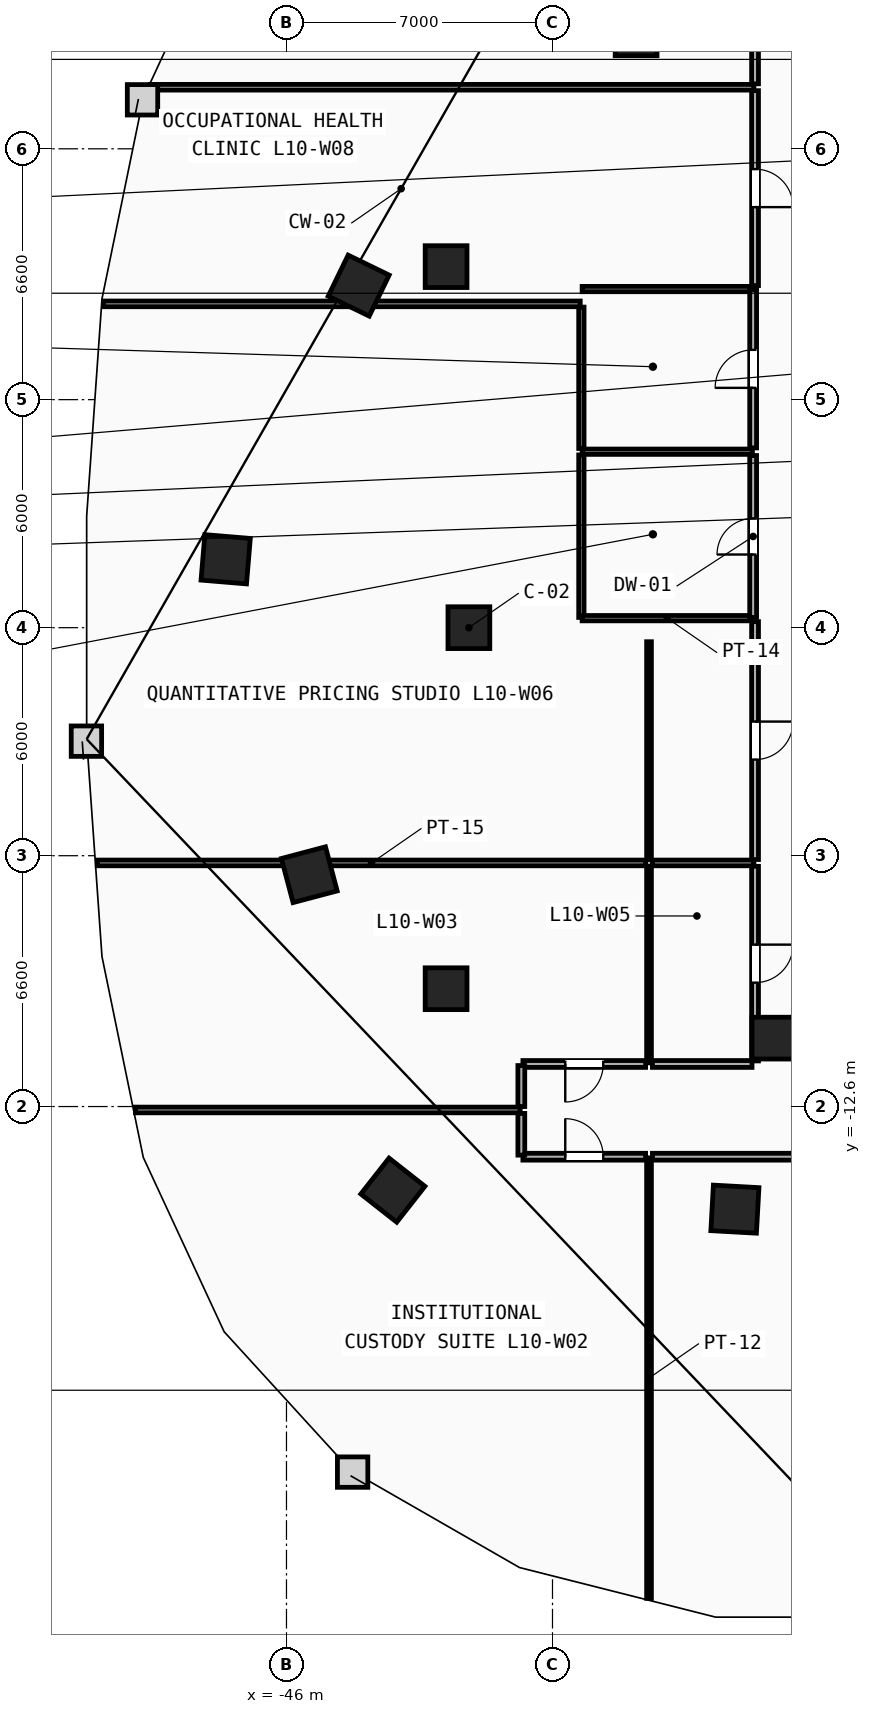
"""IFC4 building model, lengths in metres.
Left out: names, types, materials, properties, quantities, classifications, styles, units other than length and angle.
Written with IfcOpenShell. Run it as: python <this file> out.ifc"""

import sys

from ifc_helpers import new_model, si_unit, direction, frame, frame_2d, origin, origin_2d, place, context, subcontext, project, spatial, rectangle, extrude, element, fill, save


model = new_model("IFC4")
c1 = context("Model", 3, precision=1e-05, world=origin(), true_north=direction((0.0, 1.0)))
c2 = subcontext(c1, "Body", "Model", "MODEL_VIEW")
j1 = project(units=[si_unit("LENGTHUNIT", "METRE"), si_unit("PLANEANGLEUNIT", "RADIAN")], contexts=[c1])
p1 = place(None, origin())
s1 = spatial("IfcSite", under=j1, at=p1, CompositionType="ELEMENT")
p2 = place(p1, origin())
s2 = spatial("IfcBuilding", under=s1, at=p2, CompositionType="ELEMENT")
p3 = place(p2, frame((0.0, 0.0, 43.0)))
s3 = spatial("IfcBuildingStorey", under=s2, at=p3, CompositionType="ELEMENT", Elevation=43.0)
for number, where, z_axis, x_axis in (
    (1, (-41.2, 0.0, 0.0), (0.0, 0.0, 1.0), (1.0, 0.0, 0.0)),
    (2, (-41.8, 9.5, 0.0), (0.0, 0.0, 1.0), (1.0, 0.0, 0.0)),
    (3, (-36.8, 15.6, 0.0), (0.0, 0.0, 1.0), (1.0, 0.0, 0.0)),
    (4, (-41.8, -9.5, 0.0), (0.0, 0.0, 1.0), (1.0, 0.0, 0.0)),
    (5, (-33.2, -10.8, 0.0), (0.0, 0.0, 1.0), (1.0, 0.0, 0.0)),
):
    element("IfcColumn", number, at=place(p3, frame(where, z_axis=z_axis, x_axis=x_axis)), inside=s3, PredefinedType="COLUMN", context=c2, shape_type="SweptSolid", body=[
        extrude(rectangle(XDim=1.1, YDim=1.1, at=origin_2d()), origin(), (0.0, 0.0, 1.0), 3.8),
    ])
for number, where, z_axis, x_axis in (
    (6, (-44.1, 9.0, 0.0), (0.0, 0.0, 1.0), (-0.437, -0.899, 0.0)),
    (7, (-47.6, 1.8, 0.0), (0.0, 0.0, 1.0), (-0.084, -0.997, 0.0)),
    (8, (-45.4, -6.5, 0.0), (0.0, 0.0, 1.0), (0.256, -0.967, 0.0)),
    (9, (-43.2, -14.8, 0.0), (0.0, 0.0, 1.0), (0.786, -0.618, 0.0)),
    (10, (-34.2, -15.3, 0.0), (0.0, 0.0, 1.0), (0.998, -0.055, 0.0)),
):
    element("IfcColumn", number, at=place(p3, frame(where, z_axis=z_axis, x_axis=x_axis)), inside=s3, PredefinedType="COLUMN", context=c2, shape_type="SweptSolid", body=[
        extrude(rectangle(XDim=1.2, YDim=1.2, at=origin_2d()), origin(), (0.0, 0.0, 1.0), 3.8),
    ])
p4 = place(p3, frame((-38.24, 0.27, 0.0), z_axis=(0.0, 0.0, 1.0), x_axis=(0.0, 1.0, 0.0)))
e11 = element("IfcWall", 11, at=p4, inside=s3, PredefinedType="PARTITIONING", context=c2, shape_type="SweptSolid", body=[
    extrude(rectangle(XDim=4.275, YDim=0.14, at=frame_2d((2.137, 0.0))), origin(), (0.0, 0.0, 1.0), 3.5),
])
p5 = place(p3, frame((-38.24, 4.715, 0.0), z_axis=(0.0, 0.0, 1.0), x_axis=(0.0, 1.0, 0.0)))
e12 = element("IfcWall", 12, at=p5, inside=s3, PredefinedType="PARTITIONING", context=c2, shape_type="SweptSolid", body=[
    extrude(rectangle(XDim=3.72, YDim=0.14, at=frame_2d((1.86, 0.0))), origin(), (0.0, 0.0, 1.0), 3.5),
])
for number, where, z_axis, x_axis in (
    (13, (-38.22, 0.25, 0.0), (0.0, 0.0, 1.0), (1.0, 0.0, 0.0)),
    (14, (-38.22, 4.63, 0.0), (0.0, 0.0, 1.0), (1.0, 0.0, 0.0)),
    (15, (-38.22, 8.91, 0.0), (0.0, 0.0, 1.0), (1.0, 0.0, 0.0)),
):
    element("IfcWall", number, at=place(p3, frame(where, z_axis=z_axis, x_axis=x_axis)), inside=s3, PredefinedType="PARTITIONING", context=c2, shape_type="SweptSolid", body=[
        extrude(rectangle(XDim=4.48, YDim=0.14, at=frame_2d((2.24, 0.0))), origin(), (0.0, 0.0, 1.0), 3.5),
    ])
p6 = place(p3, frame((-33.72, 0.27, 0.0), z_axis=(0.0, 0.0, 1.0), x_axis=(0.0, 1.0, 0.0)))
e16 = element("IfcWall", 16, at=p6, inside=s3, PredefinedType="PARTITIONING", context=c2, shape_type="SweptSolid", body=[
    extrude(rectangle(XDim=4.26, YDim=0.18, at=frame_2d((2.13, 0.0))), origin(), (0.0, 0.0, 1.0), 3.5),
])
p7 = place(p6, frame((1.655, 0.0, 0.0)))
e17 = element("IfcOpeningElement", 17, at=p7, cuts=e16, PredefinedType="OPENING", context=c2, shape_type="SweptSolid", body=[
    extrude(rectangle(XDim=0.95, YDim=2.1, at=frame_2d((0.475, 1.05))), frame((0.0, 0.1, 0.0), z_axis=(0.0, -1.0, 0.0), x_axis=(1.0, 0.0, 0.0)), (0.0, 0.0, 1.0), 0.2),
])
p8 = place(p3, frame((-33.72, 4.73, 0.0), z_axis=(0.0, 0.0, 1.0), x_axis=(0.0, 1.0, 0.0)))
e18 = element("IfcWall", 18, at=p8, inside=s3, PredefinedType="PARTITIONING", context=c2, shape_type="SweptSolid", body=[
    extrude(rectangle(XDim=4.16, YDim=0.18, at=frame_2d((2.08, 0.0))), origin(), (0.0, 0.0, 1.0), 3.5),
])
p9 = place(p8, frame((1.58, 0.0, 0.0)))
e19 = element("IfcOpeningElement", 19, at=p9, cuts=e18, PredefinedType="OPENING", context=c2, shape_type="SweptSolid", body=[
    extrude(rectangle(XDim=1.0, YDim=2.15, at=frame_2d((0.5, 1.075))), frame((0.0, 0.1, 0.0), z_axis=(0.0, -1.0, 0.0), x_axis=(1.0, 0.0, 0.0)), (0.0, 0.0, 1.0), 0.2),
])
p10 = place(p3, frame((-36.46, -25.541, 0.0), z_axis=(0.0, 0.0, 1.0), x_axis=(0.0, 1.0, 0.0)))
e20 = element("IfcWall", 20, at=p10, inside=s3, PredefinedType="PARTITIONING", context=c2, shape_type="SweptSolid", body=[
    extrude(rectangle(XDim=11.591, YDim=0.125, at=frame_2d((5.795, 0.0))), origin(), (0.0, 0.0, 1.0), 3.5),
])
p11 = place(p3, frame((-36.46, -11.45, 0.0), z_axis=(0.0, 0.0, 1.0), x_axis=(0.0, 1.0, 0.0)))
e21 = element("IfcWall", 21, at=p11, inside=s3, PredefinedType="PARTITIONING", context=c2, shape_type="SweptSolid", body=[
    extrude(rectangle(XDim=5.175, YDim=0.125, at=frame_2d((2.587, 0.0))), origin(), (0.0, 0.0, 1.0), 3.5),
])
p12 = place(p3, frame((-36.46, -6.105, 0.0), z_axis=(0.0, 0.0, 1.0), x_axis=(0.0, 1.0, 0.0)))
e22 = element("IfcWall", 22, at=p12, inside=s3, PredefinedType="PARTITIONING", context=c2, shape_type="SweptSolid", body=[
    extrude(rectangle(XDim=5.735, YDim=0.125, at=frame_2d((2.867, 0.0))), origin(), (0.0, 0.0, 1.0), 3.5),
])
p13 = place(p3, frame((-50.979, -6.19, 0.0), z_axis=(0.0, 0.0, 1.0), x_axis=(1.0, 0.0, 0.0)))
e23 = element("IfcWall", 23, at=p13, inside=s3, PredefinedType="PARTITIONING", context=c2, shape_type="SweptSolid", body=[
    extrude(rectangle(XDim=14.434, YDim=0.15, at=frame_2d((7.217, 0.0))), origin(), (0.0, 0.0, 1.0), 3.5),
])
p14 = place(p3, frame((-36.375, -6.19, 0.0), z_axis=(0.0, 0.0, 1.0), x_axis=(1.0, 0.0, 0.0)))
e24 = element("IfcWall", 24, at=p14, inside=s3, PredefinedType="PARTITIONING", context=c2, shape_type="SweptSolid", body=[
    extrude(rectangle(XDim=2.675, YDim=0.15, at=frame_2d((1.337, 0.0))), origin(), (0.0, 0.0, 1.0), 3.5),
])
p15 = place(p3, frame((-49.974, -12.69, 0.0), z_axis=(0.0, 0.0, 1.0), x_axis=(1.0, 0.0, 0.0)))
e25 = element("IfcWall", 25, at=p15, inside=s3, PredefinedType="PARTITIONING", context=c2, shape_type="SweptSolid", body=[
    extrude(rectangle(XDim=10.124, YDim=0.15, at=frame_2d((5.062, 0.0))), origin(), (0.0, 0.0, 1.0), 3.5),
])
p16 = place(p3, frame((-50.814, 8.52, 0.0), z_axis=(0.0, 0.0, 1.0), x_axis=(1.0, 0.0, 0.0)))
e26 = element("IfcWall", 26, at=p16, inside=s3, PredefinedType="PARTITIONING", context=c2, shape_type="SweptSolid", body=[
    extrude(rectangle(XDim=12.544, YDim=0.15, at=frame_2d((6.272, 0.0))), origin(), (0.0, 0.0, 1.0), 3.5),
])
p17 = place(p3, frame((-49.585, 14.22, 0.0), z_axis=(0.0, 0.0, 1.0), x_axis=(1.0, 0.0, 0.0)))
e27 = element("IfcWall", 27, at=p17, inside=s3, PredefinedType="PARTITIONING", context=c2, shape_type="SweptSolid", body=[
    extrude(rectangle(XDim=15.885, YDim=0.15, at=frame_2d((7.942, 0.0))), origin(), (0.0, 0.0, 1.0), 3.5),
])
p18 = place(p3, frame((-36.37, -13.92, 0.0), z_axis=(0.0, 0.0, 1.0), x_axis=(1.0, 0.0, 0.0)))
e28 = element("IfcWall", 28, at=p18, inside=s3, PredefinedType="PARTITIONING", context=c2, shape_type="SweptSolid", body=[
    extrude(rectangle(XDim=11.149, YDim=0.18, at=frame_2d((5.574, 0.0))), origin(), (0.0, 0.0, 1.0), 3.5),
])
p19 = place(p18, frame((5.074, 0.0, 0.0)))
e29 = element("IfcOpeningElement", 29, at=p19, cuts=e28, PredefinedType="OPENING", context=c2, shape_type="SweptSolid", body=[
    extrude(rectangle(XDim=1.0, YDim=2.15, at=frame_2d((0.5, 1.075))), frame((0.0, 0.1, 0.0), z_axis=(0.0, -1.0, 0.0), x_axis=(1.0, 0.0, 0.0)), (0.0, 0.0, 1.0), 0.2),
])
p20 = place(p3, frame((-39.779, -13.92, 0.0), z_axis=(0.0, 0.0, 1.0), x_axis=(1.0, 0.0, 0.0)))
e30 = element("IfcWall", 30, at=p20, inside=s3, PredefinedType="PARTITIONING", context=c2, shape_type="SweptSolid", body=[
    extrude(rectangle(XDim=3.229, YDim=0.18, at=frame_2d((1.614, 0.0))), origin(), (0.0, 0.0, 1.0), 3.5),
])
p21 = place(p20, frame((1.114, 0.0, 0.0)))
e31 = element("IfcOpeningElement", 31, at=p21, cuts=e30, PredefinedType="OPENING", context=c2, shape_type="SweptSolid", body=[
    extrude(rectangle(XDim=1.0, YDim=2.15, at=frame_2d((0.5, 1.075))), frame((0.0, 0.1, 0.0), z_axis=(0.0, -1.0, 0.0), x_axis=(1.0, 0.0, 0.0)), (0.0, 0.0, 1.0), 0.2),
])
p22 = place(p3, frame((-39.82, -12.78, 0.0), z_axis=(0.0, 0.0, 1.0), x_axis=(0.0, -1.0, 0.0)))
e32 = element("IfcWall", 32, at=p22, inside=s3, PredefinedType="PARTITIONING", context=c2, shape_type="SweptSolid", body=[
    extrude(rectangle(XDim=1.098, YDim=0.18, at=frame_2d((0.549, 0.0))), origin(), (0.0, 0.0, 1.0), 3.5),
])
p23 = place(p3, frame((-36.55, -11.48, 0.0), z_axis=(0.0, 0.0, 1.0), x_axis=(-1.0, 0.0, 0.0)))
e33 = element("IfcWall", 33, at=p23, inside=s3, PredefinedType="PARTITIONING", context=c2, shape_type="SweptSolid", body=[
    extrude(rectangle(XDim=3.229, YDim=0.18, at=frame_2d((1.614, 0.0))), origin(), (0.0, 0.0, 1.0), 3.5),
])
p24 = place(p23, frame((1.114, 0.0, 0.0)))
e34 = element("IfcOpeningElement", 34, at=p24, cuts=e33, PredefinedType="OPENING", context=c2, shape_type="SweptSolid", body=[
    extrude(rectangle(XDim=1.0, YDim=2.15, at=frame_2d((0.5, 1.075))), frame((0.0, 0.1, 0.0), z_axis=(0.0, -1.0, 0.0), x_axis=(1.0, 0.0, 0.0)), (0.0, 0.0, 1.0), 0.2),
])
p25 = place(p3, frame((-39.82, -11.521, 0.0), z_axis=(0.0, 0.0, 1.0), x_axis=(0.0, -1.0, 0.0)))
e35 = element("IfcWall", 35, at=p25, inside=s3, PredefinedType="PARTITIONING", context=c2, shape_type="SweptSolid", body=[
    extrude(rectangle(XDim=1.079, YDim=0.18, at=frame_2d((0.539, 0.0))), origin(), (0.0, 0.0, 1.0), 3.5),
])
p26 = place(p3, frame((-33.67, -6.28, 0.0), z_axis=(0.0, 0.0, 1.0), x_axis=(0.0, -1.0, 0.0)))
e36 = element("IfcWall", 36, at=p26, inside=s3, PredefinedType="PARTITIONING", context=c2, shape_type="SweptSolid", body=[
    extrude(rectangle(XDim=5.12, YDim=0.18, at=frame_2d((2.56, 0.0))), origin(), (0.0, 0.0, 1.0), 3.5),
])
p27 = place(p26, frame((2.06, 0.0, 0.0)))
e37 = element("IfcOpeningElement", 37, at=p27, cuts=e36, PredefinedType="OPENING", context=c2, shape_type="SweptSolid", body=[
    extrude(rectangle(XDim=1.0, YDim=2.15, at=frame_2d((0.5, 1.075))), frame((0.0, 0.1, 0.0), z_axis=(0.0, -1.0, 0.0), x_axis=(1.0, 0.0, 0.0)), (0.0, 0.0, 1.0), 0.2),
])
p28 = place(p3, frame((-33.75, -11.48, 0.0), z_axis=(0.0, 0.0, 1.0), x_axis=(-1.0, 0.0, 0.0)))
e38 = element("IfcWall", 38, at=p28, inside=s3, PredefinedType="PARTITIONING", context=c2, shape_type="SweptSolid", body=[
    extrude(rectangle(XDim=2.62, YDim=0.18, at=frame_2d((1.31, 0.0))), origin(), (0.0, 0.0, 1.0), 3.5),
])
p29 = place(p3, frame((-33.67, 0.159, 0.0), z_axis=(0.0, 0.0, 1.0), x_axis=(0.0, -1.0, 0.0)))
e39 = element("IfcWall", 39, at=p29, inside=s3, PredefinedType="PARTITIONING", context=c2, shape_type="SweptSolid", body=[
    extrude(rectangle(XDim=6.259, YDim=0.18, at=frame_2d((3.129, 0.0))), origin(), (0.0, 0.0, 1.0), 3.5),
])
p30 = place(p29, frame((2.629, 0.0, 0.0)))
e40 = element("IfcOpeningElement", 40, at=p30, cuts=e39, PredefinedType="OPENING", context=c2, shape_type="SweptSolid", body=[
    extrude(rectangle(XDim=1.0, YDim=2.15, at=frame_2d((0.5, 1.075))), frame((0.0, 0.1, 0.0), z_axis=(0.0, -1.0, 0.0), x_axis=(1.0, 0.0, 0.0)), (0.0, 0.0, 1.0), 0.2),
])
p31 = place(p3, frame((-33.67, 14.13, 0.0), z_axis=(0.0, 0.0, 1.0), x_axis=(0.0, -1.0, 0.0)))
e41 = element("IfcWall", 41, at=p31, inside=s3, PredefinedType="PARTITIONING", context=c2, shape_type="SweptSolid", body=[
    extrude(rectangle(XDim=5.128, YDim=0.18, at=frame_2d((2.564, 0.0))), origin(), (0.0, 0.0, 1.0), 3.5),
])
p32 = place(p31, frame((2.064, 0.0, 0.0)))
e42 = element("IfcOpeningElement", 42, at=p32, cuts=e41, PredefinedType="OPENING", context=c2, shape_type="SweptSolid", body=[
    extrude(rectangle(XDim=1.0, YDim=2.15, at=frame_2d((0.5, 1.075))), frame((0.0, 0.1, 0.0), z_axis=(0.0, -1.0, 0.0), x_axis=(1.0, 0.0, 0.0)), (0.0, 0.0, 1.0), 0.2),
])
p33 = place(p3, frame((-33.67, 17.428, 0.0), z_axis=(0.0, 0.0, 1.0), x_axis=(0.0, -1.0, 0.0)))
e43 = element("IfcWall", 43, at=p33, inside=s3, PredefinedType="PARTITIONING", context=c2, shape_type="SweptSolid", body=[
    extrude(rectangle(XDim=3.118, YDim=0.18, at=frame_2d((1.559, 0.0))), origin(), (0.0, 0.0, 1.0), 3.5),
])
p34 = place(p30, origin())
e44 = element("IfcDoor", 44, at=p34, inside=s3, OperationType="SINGLE_SWING_LEFT", PredefinedType="DOOR", context=c2, shape_type="SweptSolid", body=[
    extrude(rectangle(XDim=1.0, YDim=2.15, at=frame_2d((0.5, 1.075))), frame((0.0, 0.025, 0.0), z_axis=(0.0, -1.0, 0.0), x_axis=(1.0, 0.0, 0.0)), (0.0, 0.0, 1.0), 0.05),
])
fill(e40, e44)
p35 = place(p32, origin())
e45 = element("IfcDoor", 45, at=p35, inside=s3, OperationType="SINGLE_SWING_RIGHT", PredefinedType="DOOR", context=c2, shape_type="SweptSolid", body=[
    extrude(rectangle(XDim=1.0, YDim=2.15, at=frame_2d((0.5, 1.075))), frame((0.0, 0.025, 0.0), z_axis=(0.0, -1.0, 0.0), x_axis=(1.0, 0.0, 0.0)), (0.0, 0.0, 1.0), 0.05),
])
fill(e42, e45)
p36 = place(p27, origin())
e46 = element("IfcDoor", 46, at=p36, inside=s3, OperationType="SINGLE_SWING_LEFT", PredefinedType="DOOR", context=c2, shape_type="SweptSolid", body=[
    extrude(rectangle(XDim=1.0, YDim=2.15, at=frame_2d((0.5, 1.075))), frame((0.0, 0.025, 0.0), z_axis=(0.0, -1.0, 0.0), x_axis=(1.0, 0.0, 0.0)), (0.0, 0.0, 1.0), 0.05),
])
fill(e37, e46)
p37 = place(p7, origin())
e47 = element("IfcDoor", 47, at=p37, inside=s3, OperationType="SINGLE_SWING_LEFT", PredefinedType="DOOR", context=c2, shape_type="SweptSolid", body=[
    extrude(rectangle(XDim=0.95, YDim=2.1, at=frame_2d((0.475, 1.05))), frame((0.0, 0.025, 0.0), z_axis=(0.0, -1.0, 0.0), x_axis=(1.0, 0.0, 0.0)), (0.0, 0.0, 1.0), 0.05),
])
fill(e17, e47)
p38 = place(p9, origin())
e48 = element("IfcDoor", 48, at=p38, inside=s3, OperationType="SINGLE_SWING_LEFT", PredefinedType="DOOR", context=c2, shape_type="SweptSolid", body=[
    extrude(rectangle(XDim=1.0, YDim=2.15, at=frame_2d((0.5, 1.075))), frame((0.0, 0.025, 0.0), z_axis=(0.0, -1.0, 0.0), x_axis=(1.0, 0.0, 0.0)), (0.0, 0.0, 1.0), 0.05),
])
fill(e19, e48)
p39 = place(p21, origin())
e49 = element("IfcDoor", 49, at=p39, inside=s3, OperationType="SINGLE_SWING_LEFT", PredefinedType="DOOR", context=c2, shape_type="SweptSolid", body=[
    extrude(rectangle(XDim=1.0, YDim=2.15, at=frame_2d((0.5, 1.075))), frame((0.0, 0.025, 0.0), z_axis=(0.0, -1.0, 0.0), x_axis=(1.0, 0.0, 0.0)), (0.0, 0.0, 1.0), 0.05),
])
fill(e31, e49)
p40 = place(p24, origin())
e50 = element("IfcDoor", 50, at=p40, inside=s3, OperationType="SINGLE_SWING_RIGHT", PredefinedType="DOOR", context=c2, shape_type="SweptSolid", body=[
    extrude(rectangle(XDim=1.0, YDim=2.15, at=frame_2d((0.5, 1.075))), frame((0.0, 0.025, 0.0), z_axis=(0.0, -1.0, 0.0), x_axis=(1.0, 0.0, 0.0)), (0.0, 0.0, 1.0), 0.05),
])
fill(e34, e50)
save(model, sys.argv[1])
